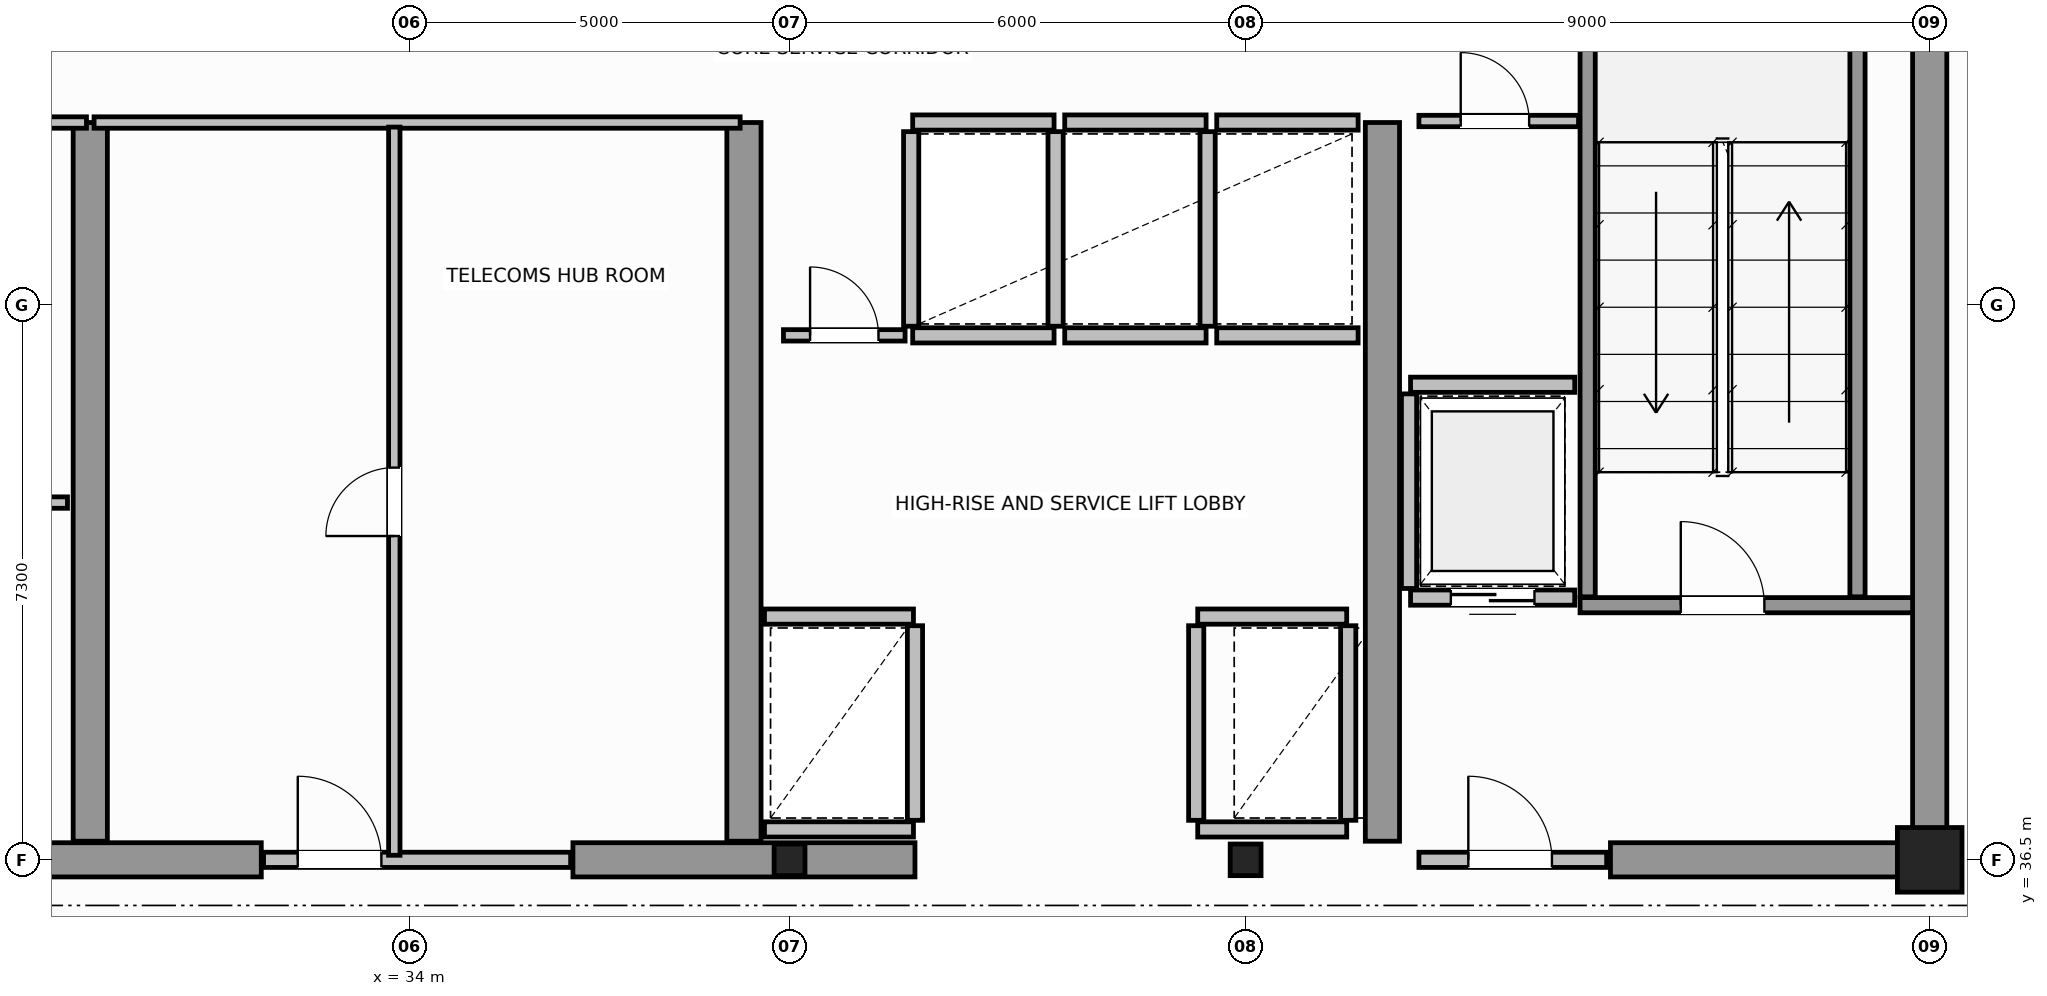
"""IFC4 building model, lengths in metres.
Left out: names, types, materials, properties, quantities, classifications, styles, units other than length and angle.
Written with IfcOpenShell. Run it as: python <this file> out.ifc"""

import sys

from ifc_helpers import new_model, si_unit, direction, frame, frame_2d, origin, origin_2d, place, context, subcontext, project, spatial, rectangle, i_section, extrude, source, transform, mapped, element, fill, save


model = new_model("IFC4")
c1 = context("Model", 3, precision=1e-05, world=origin(), true_north=direction((0.0, 1.0)))
c2 = subcontext(c1, "Body", "Model", "MODEL_VIEW")
j1 = project(units=[si_unit("LENGTHUNIT", "METRE"), si_unit("PLANEANGLEUNIT", "RADIAN")], contexts=[c1])
p1 = place(None, origin())
s1 = spatial("IfcSite", under=j1, at=p1, CompositionType="ELEMENT")
p2 = place(p1, origin())
s2 = spatial("IfcBuilding", under=s1, at=p2, CompositionType="ELEMENT")
p3 = place(p2, frame((0.0, 0.0, 303.8)))
s3 = spatial("IfcBuildingStorey", under=s2, at=p3, CompositionType="ELEMENT", Elevation=303.8)
m1 = source(origin(), c2, "Body", "SweptSolid", [
    extrude(i_section(OverallWidth=0.406, OverallDepth=0.416, WebThickness=0.03, FlangeThickness=0.042, FilletRadius=0.015, at=origin_2d()), origin(), (0.0, 0.0, 1.0), 4.6),
])
for number, where, z_axis, x_axis in (
    (1, (39.0, 36.5, 0.0), (0.0, 0.0, 1.0), (1.0, 0.0, 0.0)),
    (2, (45.0, 36.5, 0.0), (0.0, 0.0, 1.0), (1.0, 0.0, 0.0)),
):
    element("IfcColumn", number, at=place(p3, frame(where, z_axis=z_axis, x_axis=x_axis)), inside=s3, PredefinedType="COLUMN", context=c2, shape_type="MappedRepresentation", body=[
        mapped(m1, transform((0.0, 0.0, 0.0), scale=1.0)),
    ])
m2 = source(origin(), c2, "Body", "SweptSolid", [
    extrude(rectangle(XDim=0.85, YDim=0.85, at=origin_2d()), origin(), (0.0, 0.0, 1.0), 4.6),
])
p4 = place(p3, frame((54.0, 36.5, 0.0), z_axis=(0.0, 0.0, 1.0), x_axis=(1.0, 0.0, 0.0)))
e3 = element("IfcColumn", 3, at=p4, inside=s3, PredefinedType="COLUMN", context=c2, shape_type="MappedRepresentation", body=[
    mapped(m2, transform((0.0, 0.0, 0.0), scale=1.0)),
])
p5 = place(p3, frame((54.0, 36.5, 0.0), z_axis=(0.0, 0.0, 1.0), x_axis=(0.0, 1.0, 0.0)))
e4 = element("IfcWall", 4, at=p5, inside=s3, PredefinedType="SHEAR", context=c2, shape_type="SweptSolid", body=[
    extrude(rectangle(XDim=14.5, YDim=0.45, at=frame_2d((7.25, 0.0))), origin(), (0.0, 0.0, 1.0), 4.6),
])
for number, where, z_axis, x_axis in (
    (5, (27.55, 36.5, 0.0), (0.0, 0.0, 1.0), (1.0, 0.0, 0.0)),
    (6, (36.15, 36.5, 0.0), (0.0, 0.0, 1.0), (1.0, 0.0, 0.0)),
):
    element("IfcWall", number, at=place(p3, frame(where, z_axis=z_axis, x_axis=x_axis)), inside=s3, PredefinedType="SHEAR", context=c2, shape_type="SweptSolid", body=[
        extrude(rectangle(XDim=4.5, YDim=0.45, at=frame_2d((2.25, 0.0))), origin(), (0.0, 0.0, 1.0), 4.6),
    ])
p6 = place(p3, frame((49.8, 36.5, 0.0), z_axis=(0.0, 0.0, 1.0), x_axis=(1.0, 0.0, 0.0)))
e7 = element("IfcWall", 7, at=p6, inside=s3, PredefinedType="SHEAR", context=c2, shape_type="SweptSolid", body=[
    extrude(rectangle(XDim=3.955, YDim=0.45, at=frame_2d((1.978, 0.0))), origin(), (0.0, 0.0, 1.0), 3.3),
])
for number, where, z_axis, x_axis in (
    (8, (29.8, 36.745, 0.0), (0.0, 0.0, 1.0), (0.0, 1.0, 0.0)),
    (9, (38.4, 36.745, 0.0), (0.0, 0.0, 1.0), (0.0, 1.0, 0.0)),
    (10, (46.8, 36.745, 0.0), (0.0, 0.0, 1.0), (0.0, 1.0, 0.0)),
):
    element("IfcWall", number, at=place(p3, frame(where, z_axis=z_axis, x_axis=x_axis)), inside=s3, PredefinedType="SHEAR", context=c2, shape_type="SweptSolid", body=[
        extrude(rectangle(XDim=9.455, YDim=0.45, at=frame_2d((4.728, 0.0))), origin(), (0.0, 0.0, 1.0), 4.6),
    ])
p7 = place(p3, frame((49.4, 39.85, 0.0), z_axis=(0.0, 0.0, 1.0), x_axis=(1.0, 0.0, 0.0)))
e11 = element("IfcWall", 11, at=p7, inside=s3, PredefinedType="SOLIDWALL", context=c2, shape_type="SweptSolid", body=[
    extrude(rectangle(XDim=4.375, YDim=0.2, at=frame_2d((2.188, 0.0))), origin(), (0.0, 0.0, 1.0), 4.6),
])
p8 = place(p7, frame((1.325, 0.0, 0.0)))
e12 = element("IfcOpeningElement", 12, at=p8, cuts=e11, PredefinedType="OPENING", context=c2, shape_type="SweptSolid", body=[
    extrude(rectangle(XDim=1.1, YDim=2.15, at=frame_2d((0.55, 1.075))), frame((0.0, 0.11, 0.0), z_axis=(0.0, -1.0, 0.0), x_axis=(1.0, 0.0, 0.0)), (0.0, 0.0, 1.0), 0.22),
])
for number, where, z_axis, x_axis in (
    (13, (49.5, 39.96, 0.0), (0.0, 0.0, 1.0), (0.0, 1.0, 0.0)),
    (14, (53.05, 39.96, 0.0), (0.0, 0.0, 1.0), (0.0, 1.0, 0.0)),
):
    element("IfcWall", number, at=place(p3, frame(where, z_axis=z_axis, x_axis=x_axis)), inside=s3, PredefinedType="SOLIDWALL", context=c2, shape_type="SweptSolid", body=[
        extrude(rectangle(XDim=9.93, YDim=0.2, at=frame_2d((4.965, 0.0))), origin(), (0.0, 0.0, 1.0), 4.6),
    ])
p9 = place(p3, frame((47.28, 36.5, 0.0), z_axis=(0.0, 0.0, 1.0), x_axis=(1.0, 0.0, 0.0)))
e15 = element("IfcWall", 15, at=p9, inside=s3, PredefinedType="SOLIDWALL", context=c2, shape_type="SweptSolid", body=[
    extrude(rectangle(XDim=2.47, YDim=0.2, at=frame_2d((1.235, 0.0))), origin(), (0.0, 0.0, 1.0), 3.29),
])
p10 = place(p9, frame((0.65, 0.0, 0.0)))
e16 = element("IfcOpeningElement", 16, at=p10, cuts=e15, PredefinedType="OPENING", context=c2, shape_type="SweptSolid", body=[
    extrude(rectangle(XDim=1.1, YDim=2.15, at=frame_2d((0.55, 1.075))), frame((0.0, 0.11, 0.0), z_axis=(0.0, -1.0, 0.0), x_axis=(1.0, 0.0, 0.0)), (0.0, 0.0, 1.0), 0.22),
])
p11 = place(p3, frame((38.67, 39.7, 0.0), z_axis=(0.0, 0.0, 1.0), x_axis=(1.0, 0.0, 0.0)))
e17 = element("IfcWall", 17, at=p11, inside=s3, PredefinedType="SOLIDWALL", context=c2, shape_type="SweptSolid", body=[
    extrude(rectangle(XDim=1.96, YDim=0.2, at=frame_2d((0.98, 0.0))), origin(), (0.0, 0.0, 1.0), 4.3),
])
p12 = place(p3, frame((38.67, 36.9, 0.0), z_axis=(0.0, 0.0, 1.0), x_axis=(1.0, 0.0, 0.0)))
e18 = element("IfcWall", 18, at=p12, inside=s3, PredefinedType="SOLIDWALL", context=c2, shape_type="SweptSolid", body=[
    extrude(rectangle(XDim=1.96, YDim=0.2, at=frame_2d((0.98, 0.0))), origin(), (0.0, 0.0, 1.0), 3.09),
])
p13 = place(p3, frame((40.65, 37.02, 0.0), z_axis=(0.0, 0.0, 1.0), x_axis=(0.0, 1.0, 0.0)))
e19 = element("IfcWall", 19, at=p13, inside=s3, PredefinedType="SOLIDWALL", context=c2, shape_type="SweptSolid", body=[
    extrude(rectangle(XDim=2.56, YDim=0.2, at=frame_2d((1.28, 0.0))), origin(), (0.0, 0.0, 1.0), 4.3),
])
p14 = place(p3, frame((44.37, 39.7, 0.0), z_axis=(0.0, 0.0, 1.0), x_axis=(1.0, 0.0, 0.0)))
e20 = element("IfcWall", 20, at=p14, inside=s3, PredefinedType="SOLIDWALL", context=c2, shape_type="SweptSolid", body=[
    extrude(rectangle(XDim=1.96, YDim=0.2, at=frame_2d((0.98, 0.0))), origin(), (0.0, 0.0, 1.0), 4.3),
])
p15 = place(p3, frame((44.37, 36.9, 0.0), z_axis=(0.0, 0.0, 1.0), x_axis=(1.0, 0.0, 0.0)))
e21 = element("IfcWall", 21, at=p15, inside=s3, PredefinedType="SOLIDWALL", context=c2, shape_type="SweptSolid", body=[
    extrude(rectangle(XDim=1.96, YDim=0.2, at=frame_2d((0.98, 0.0))), origin(), (0.0, 0.0, 1.0), 3.09),
])
for number, where, z_axis, x_axis in (
    (22, (44.35, 37.02, 0.0), (0.0, 0.0, 1.0), (0.0, 1.0, 0.0)),
    (23, (46.35, 37.02, 0.0), (0.0, 0.0, 1.0), (0.0, 1.0, 0.0)),
):
    element("IfcWall", number, at=place(p3, frame(where, z_axis=z_axis, x_axis=x_axis)), inside=s3, PredefinedType="SOLIDWALL", context=c2, shape_type="SweptSolid", body=[
        extrude(rectangle(XDim=2.56, YDim=0.2, at=frame_2d((1.28, 0.0))), origin(), (0.0, 0.0, 1.0), 4.3),
    ])
for number, where, z_axis, x_axis in (
    (24, (40.62, 43.4, 0.0), (0.0, 0.0, 1.0), (1.0, 0.0, 0.0)),
    (25, (40.62, 46.2, 0.0), (0.0, 0.0, 1.0), (1.0, 0.0, 0.0)),
):
    element("IfcWall", number, at=place(p3, frame(where, z_axis=z_axis, x_axis=x_axis)), inside=s3, PredefinedType="SOLIDWALL", context=c2, shape_type="SweptSolid", body=[
        extrude(rectangle(XDim=1.86, YDim=0.2, at=frame_2d((0.93, 0.0))), origin(), (0.0, 0.0, 1.0), 4.3),
    ])
for number, where, z_axis, x_axis in (
    (26, (40.6, 43.52, 0.0), (0.0, 0.0, 1.0), (0.0, 1.0, 0.0)),
    (27, (42.5, 43.52, 0.0), (0.0, 0.0, 1.0), (0.0, 1.0, 0.0)),
):
    element("IfcWall", number, at=place(p3, frame(where, z_axis=z_axis, x_axis=x_axis)), inside=s3, PredefinedType="SOLIDWALL", context=c2, shape_type="SweptSolid", body=[
        extrude(rectangle(XDim=2.56, YDim=0.2, at=frame_2d((1.28, 0.0))), origin(), (0.0, 0.0, 1.0), 4.3),
    ])
for number, where, z_axis, x_axis in (
    (28, (42.62, 43.4, 0.0), (0.0, 0.0, 1.0), (1.0, 0.0, 0.0)),
    (29, (42.62, 46.2, 0.0), (0.0, 0.0, 1.0), (1.0, 0.0, 0.0)),
):
    element("IfcWall", number, at=place(p3, frame(where, z_axis=z_axis, x_axis=x_axis)), inside=s3, PredefinedType="SOLIDWALL", context=c2, shape_type="SweptSolid", body=[
        extrude(rectangle(XDim=1.86, YDim=0.2, at=frame_2d((0.93, 0.0))), origin(), (0.0, 0.0, 1.0), 4.3),
    ])
p16 = place(p3, frame((44.5, 43.52, 0.0), z_axis=(0.0, 0.0, 1.0), x_axis=(0.0, 1.0, 0.0)))
e30 = element("IfcWall", 30, at=p16, inside=s3, PredefinedType="SOLIDWALL", context=c2, shape_type="SweptSolid", body=[
    extrude(rectangle(XDim=2.56, YDim=0.2, at=frame_2d((1.28, 0.0))), origin(), (0.0, 0.0, 1.0), 3.09),
])
for number, where, z_axis, x_axis in (
    (31, (44.62, 43.4, 0.0), (0.0, 0.0, 1.0), (1.0, 0.0, 0.0)),
    (32, (44.62, 46.2, 0.0), (0.0, 0.0, 1.0), (1.0, 0.0, 0.0)),
):
    element("IfcWall", number, at=place(p3, frame(where, z_axis=z_axis, x_axis=x_axis)), inside=s3, PredefinedType="SOLIDWALL", context=c2, shape_type="SweptSolid", body=[
        extrude(rectangle(XDim=1.86, YDim=0.2, at=frame_2d((0.93, 0.0))), origin(), (0.0, 0.0, 1.0), 4.3),
    ])
p17 = place(p3, frame((47.17, 39.95, 0.0), z_axis=(0.0, 0.0, 1.0), x_axis=(1.0, 0.0, 0.0)))
e33 = element("IfcWall", 33, at=p17, inside=s3, PredefinedType="SOLIDWALL", context=c2, shape_type="SweptSolid", body=[
    extrude(rectangle(XDim=2.16, YDim=0.2, at=frame_2d((1.08, 0.0))), origin(), (0.0, 0.0, 1.0), 4.3),
])
p18 = place(p17, frame((0.53, 0.0, 0.0)))
e34 = element("IfcOpeningElement", 34, at=p18, cuts=e33, PredefinedType="OPENING", context=c2, shape_type="SweptSolid", body=[
    extrude(rectangle(XDim=1.1, YDim=2.15, at=frame_2d((0.55, 1.075))), frame((0.0, 0.11, 0.0), z_axis=(0.0, -1.0, 0.0), x_axis=(1.0, 0.0, 0.0)), (0.0, 0.0, 1.0), 0.22),
])
p19 = place(p3, frame((47.17, 42.75, 0.0), z_axis=(0.0, 0.0, 1.0), x_axis=(1.0, 0.0, 0.0)))
e35 = element("IfcWall", 35, at=p19, inside=s3, PredefinedType="SOLIDWALL", context=c2, shape_type="SweptSolid", body=[
    extrude(rectangle(XDim=2.16, YDim=0.2, at=frame_2d((1.08, 0.0))), origin(), (0.0, 0.0, 1.0), 4.3),
])
p20 = place(p3, frame((47.15, 40.07, 0.0), z_axis=(0.0, 0.0, 1.0), x_axis=(0.0, 1.0, 0.0)))
e36 = element("IfcWall", 36, at=p20, inside=s3, PredefinedType="SOLIDWALL", context=c2, shape_type="SweptSolid", body=[
    extrude(rectangle(XDim=2.56, YDim=0.2, at=frame_2d((1.28, 0.0))), origin(), (0.0, 0.0, 1.0), 4.3),
])
p21 = place(p3, frame((21.25, 46.2, 0.0), z_axis=(0.0, 0.0, 1.0), x_axis=(1.0, 0.0, 0.0)))
e37 = element("IfcWall", 37, at=p21, inside=s3, PredefinedType="PARTITIONING", context=c2, shape_type="SweptSolid", body=[
    extrude(rectangle(XDim=8.5, YDim=0.15, at=frame_2d((4.25, 0.0))), origin(), (0.0, 0.0, 1.0), 4.3),
])
p22 = place(p3, frame((21.5, 41.2, 0.0), z_axis=(0.0, 0.0, 1.0), x_axis=(1.0, 0.0, 0.0)))
e38 = element("IfcWall", 38, at=p22, inside=s3, PredefinedType="PARTITIONING", context=c2, shape_type="SweptSolid", body=[
    extrude(rectangle(XDim=8.0, YDim=0.15, at=frame_2d((4.0, 0.0))), origin(), (0.0, 0.0, 1.0), 4.3),
])
p23 = place(p22, frame((3.4, 0.0, 0.0)))
e39 = element("IfcOpeningElement", 39, at=p23, cuts=e38, PredefinedType="OPENING", context=c2, shape_type="SweptSolid", body=[
    extrude(rectangle(XDim=0.9, YDim=2.1, at=frame_2d((0.45, 1.05))), frame((0.0, 0.085, 0.0), z_axis=(0.0, -1.0, 0.0), x_axis=(1.0, 0.0, 0.0)), (0.0, 0.0, 1.0), 0.17),
])
p24 = place(p3, frame((32.08, 36.5, 0.0), z_axis=(0.0, 0.0, 1.0), x_axis=(1.0, 0.0, 0.0)))
e40 = element("IfcWall", 40, at=p24, inside=s3, PredefinedType="SOLIDWALL", context=c2, shape_type="SweptSolid", body=[
    extrude(rectangle(XDim=4.04, YDim=0.2, at=frame_2d((2.02, 0.0))), origin(), (0.0, 0.0, 1.0), 3.09),
])
p25 = place(p24, frame((0.45, 0.0, 0.0)))
e41 = element("IfcOpeningElement", 41, at=p25, cuts=e40, PredefinedType="OPENING", context=c2, shape_type="SweptSolid", body=[
    extrude(rectangle(XDim=1.1, YDim=2.15, at=frame_2d((0.55, 1.075))), frame((0.0, 0.11, 0.0), z_axis=(0.0, -1.0, 0.0), x_axis=(1.0, 0.0, 0.0)), (0.0, 0.0, 1.0), 0.22),
])
p26 = place(p3, frame((29.85, 46.2, 0.0), z_axis=(0.0, 0.0, 1.0), x_axis=(1.0, 0.0, 0.0)))
e42 = element("IfcWall", 42, at=p26, inside=s3, PredefinedType="PARTITIONING", context=c2, shape_type="SweptSolid", body=[
    extrude(rectangle(XDim=8.5, YDim=0.15, at=frame_2d((4.25, 0.0))), origin(), (0.0, 0.0, 1.0), 4.3),
])
p27 = place(p3, frame((33.8, 36.56, 0.0), z_axis=(0.0, 0.0, 1.0), x_axis=(0.0, 1.0, 0.0)))
e43 = element("IfcWall", 43, at=p27, inside=s3, PredefinedType="PARTITIONING", context=c2, shape_type="SweptSolid", body=[
    extrude(rectangle(XDim=9.58, YDim=0.15, at=frame_2d((4.79, 0.0))), origin(), (0.0, 0.0, 1.0), 4.3),
])
p28 = place(p27, frame((4.2, 0.0, 0.0)))
e44 = element("IfcOpeningElement", 44, at=p28, cuts=e43, PredefinedType="OPENING", context=c2, shape_type="SweptSolid", body=[
    extrude(rectangle(XDim=0.9, YDim=2.1, at=frame_2d((0.45, 1.05))), frame((0.0, 0.085, 0.0), z_axis=(0.0, -1.0, 0.0), x_axis=(1.0, 0.0, 0.0)), (0.0, 0.0, 1.0), 0.17),
])
p29 = place(p3, frame((47.28, 46.22, 0.0), z_axis=(0.0, 0.0, 1.0), x_axis=(1.0, 0.0, 0.0)))
e45 = element("IfcWall", 45, at=p29, inside=s3, PredefinedType="PARTITIONING", context=c2, shape_type="SweptSolid", body=[
    extrude(rectangle(XDim=2.1, YDim=0.15, at=frame_2d((1.05, 0.0))), origin(), (0.0, 0.0, 1.0), 4.3),
])
p30 = place(p29, frame((0.55, 0.0, 0.0)))
e46 = element("IfcOpeningElement", 46, at=p30, cuts=e45, PredefinedType="OPENING", context=c2, shape_type="SweptSolid", body=[
    extrude(rectangle(XDim=0.9, YDim=2.1, at=frame_2d((0.45, 1.05))), frame((0.0, 0.085, 0.0), z_axis=(0.0, -1.0, 0.0), x_axis=(1.0, 0.0, 0.0)), (0.0, 0.0, 1.0), 0.17),
])
p31 = place(p3, frame((38.92, 43.4, 0.0), z_axis=(0.0, 0.0, 1.0), x_axis=(1.0, 0.0, 0.0)))
e47 = element("IfcWall", 47, at=p31, inside=s3, PredefinedType="PARTITIONING", context=c2, shape_type="SweptSolid", body=[
    extrude(rectangle(XDim=1.6, YDim=0.15, at=frame_2d((0.8, 0.0))), origin(), (0.0, 0.0, 1.0), 4.3),
])
p32 = place(p31, frame((0.35, 0.0, 0.0)))
e48 = element("IfcOpeningElement", 48, at=p32, cuts=e47, PredefinedType="OPENING", context=c2, shape_type="SweptSolid", body=[
    extrude(rectangle(XDim=0.9, YDim=2.1, at=frame_2d((0.45, 1.05))), frame((0.0, 0.085, 0.0), z_axis=(0.0, -1.0, 0.0), x_axis=(1.0, 0.0, 0.0)), (0.0, 0.0, 1.0), 0.17),
])
m3 = source(origin(), c2, "Body", "SweptSolid", [
    extrude(rectangle(XDim=1.1, YDim=2.15, at=frame_2d((0.55, 1.075))), frame((0.0, 0.025, 0.0), z_axis=(0.0, -1.0, 0.0), x_axis=(1.0, 0.0, 0.0)), (0.0, 0.0, 1.0), 0.05),
])
p33 = place(p8, origin())
e49 = element("IfcDoor", 49, at=p33, inside=s3, OperationType="SINGLE_SWING_RIGHT", PredefinedType="DOOR", context=c2, shape_type="MappedRepresentation", body=[
    mapped(m3, transform((0.0, 0.0, 0.0), scale=1.0)),
])
fill(e12, e49)
p34 = place(p10, origin())
e50 = element("IfcDoor", 50, at=p34, inside=s3, OperationType="SINGLE_SWING_LEFT", PredefinedType="DOOR", context=c2, shape_type="MappedRepresentation", body=[
    mapped(m3, transform((0.0, 0.0, 0.0), scale=1.0)),
])
fill(e16, e50)
p35 = place(p18, origin())
e51 = element("IfcDoor", 51, at=p35, inside=s3, OperationType="DOUBLE_DOOR_SLIDING", PredefinedType="DOOR", context=c2, shape_type="MappedRepresentation", body=[
    mapped(m3, transform((0.0, 0.0, 0.0), scale=1.0)),
])
fill(e34, e51)
p36 = place(p25, origin())
e52 = element("IfcDoor", 52, at=p36, inside=s3, OperationType="SINGLE_SWING_LEFT", PredefinedType="DOOR", context=c2, shape_type="MappedRepresentation", body=[
    mapped(m3, transform((0.0, 0.0, 0.0), scale=1.0)),
])
fill(e41, e52)
m4 = source(origin(), c2, "Body", "SweptSolid", [
    extrude(rectangle(XDim=0.9, YDim=2.1, at=frame_2d((0.45, 1.05))), frame((0.0, 0.025, 0.0), z_axis=(0.0, -1.0, 0.0), x_axis=(1.0, 0.0, 0.0)), (0.0, 0.0, 1.0), 0.05),
])
p37 = place(p28, origin())
e53 = element("IfcDoor", 53, at=p37, inside=s3, OperationType="SINGLE_SWING_RIGHT", PredefinedType="DOOR", context=c2, shape_type="MappedRepresentation", body=[
    mapped(m4, transform((0.0, 0.0, 0.0), scale=1.0)),
])
fill(e44, e53)
p38 = place(p30, origin())
e54 = element("IfcDoor", 54, at=p38, inside=s3, OperationType="SINGLE_SWING_RIGHT", PredefinedType="DOOR", context=c2, shape_type="MappedRepresentation", body=[
    mapped(m4, transform((0.0, 0.0, 0.0), scale=1.0)),
])
fill(e46, e54)
p39 = place(p32, origin())
e55 = element("IfcDoor", 55, at=p39, inside=s3, OperationType="SINGLE_SWING_LEFT", PredefinedType="DOOR", context=c2, shape_type="MappedRepresentation", body=[
    mapped(m4, transform((0.0, 0.0, 0.0), scale=1.0)),
])
fill(e48, e55)
save(model, sys.argv[1])
